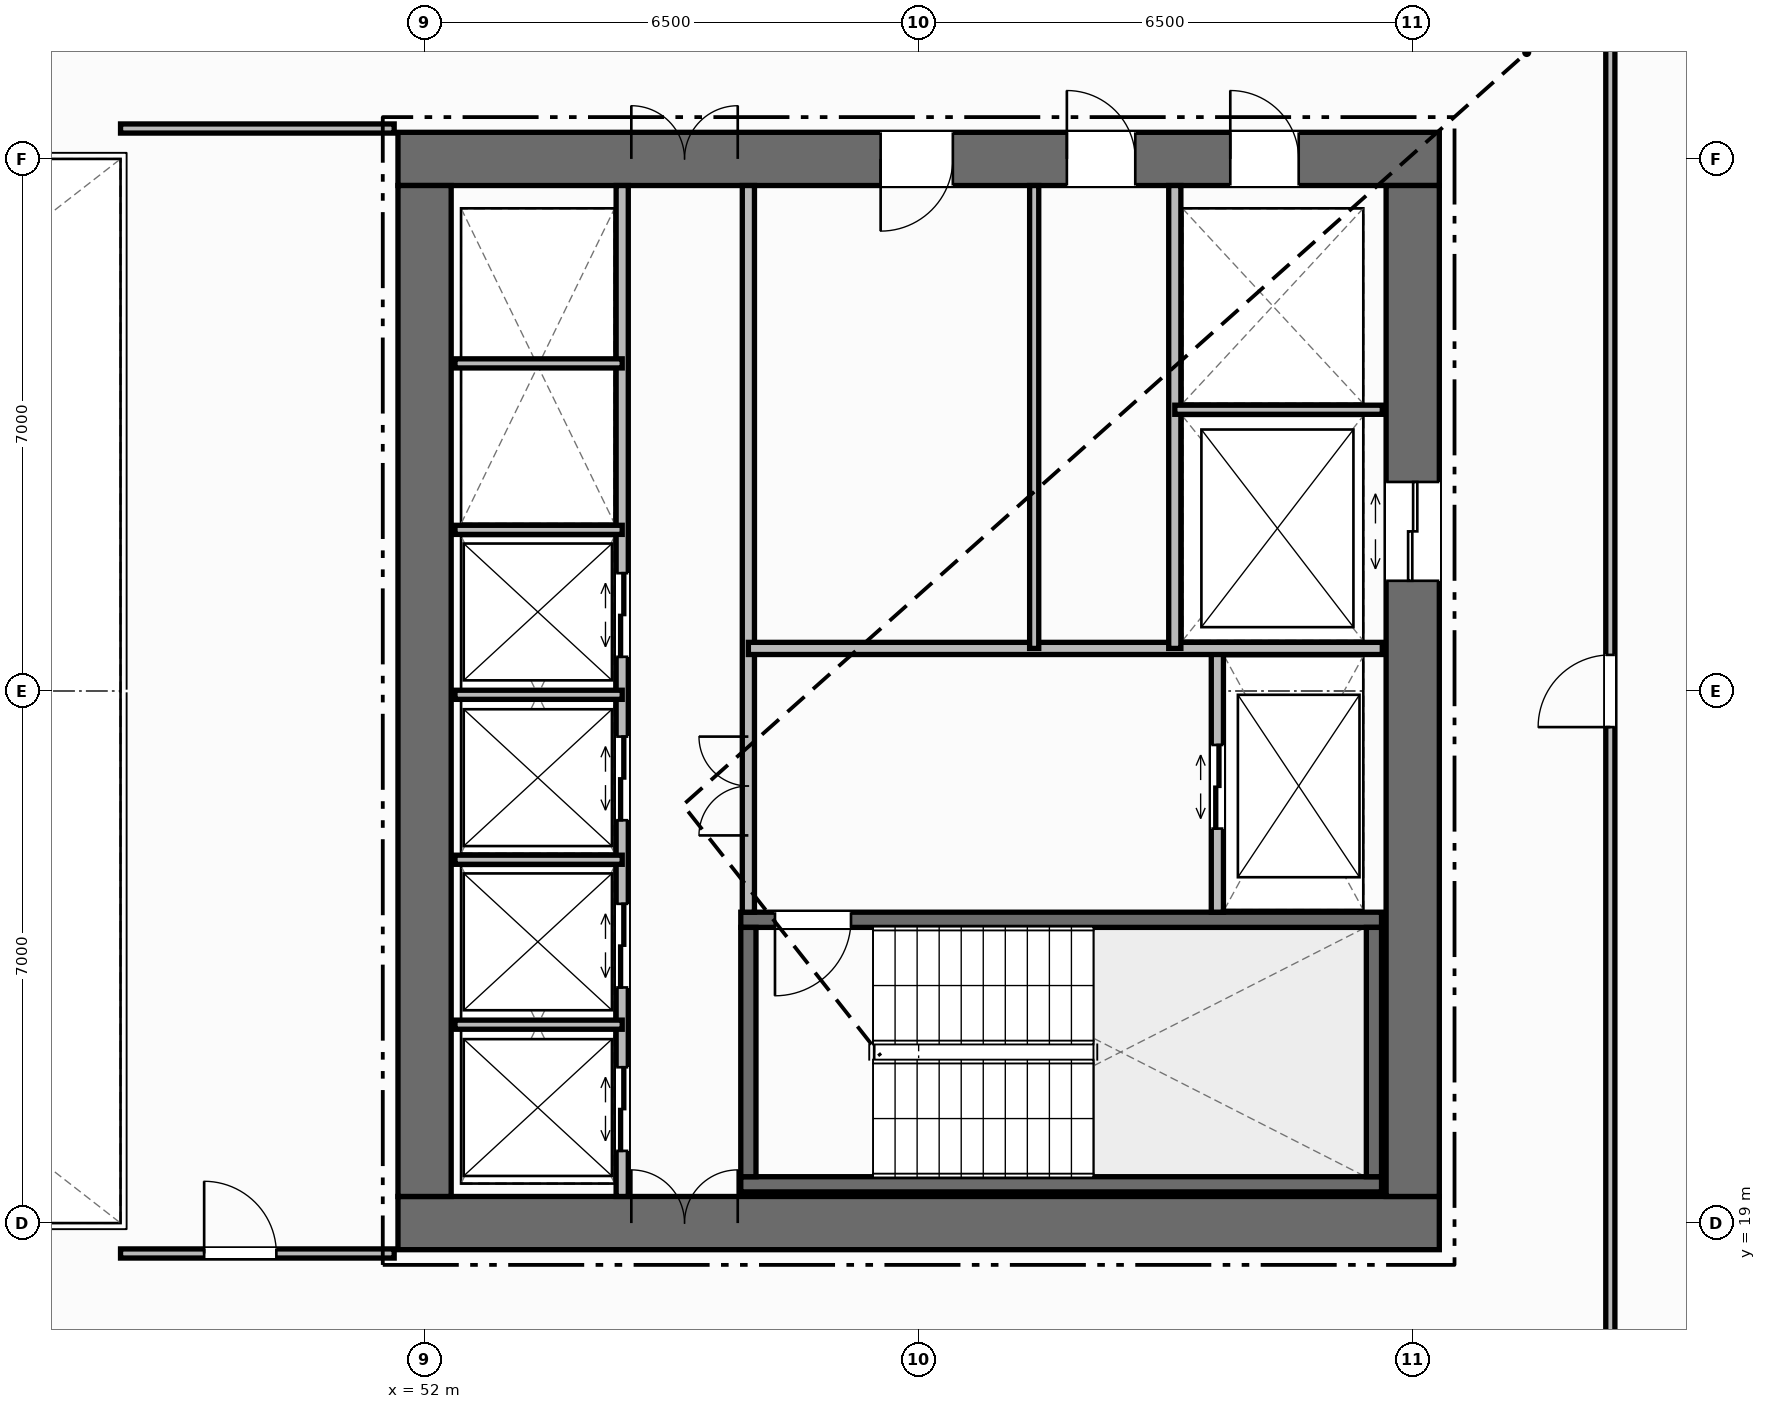
"""IFC4 building model, lengths in metres.
Left out: names, types, materials, properties, quantities, classifications, styles, units other than length and angle.
Written with IfcOpenShell. Run it as: python <this file> out.ifc"""

import sys

from ifc_helpers import new_model, si_unit, direction, frame, frame_2d, origin, place, context, subcontext, project, spatial, rectangle, extrude, element, fill, save


model = new_model("IFC4")
c1 = context("Model", 3, precision=1e-05, world=origin(), true_north=direction((0.0, 1.0)))
c2 = subcontext(c1, "Body", "Model", "MODEL_VIEW")
j1 = project(units=[si_unit("LENGTHUNIT", "METRE"), si_unit("PLANEANGLEUNIT", "RADIAN")], contexts=[c1])
p1 = place(None, origin())
s1 = spatial("IfcSite", under=j1, at=p1, CompositionType="ELEMENT")
p2 = place(p1, origin())
s2 = spatial("IfcBuilding", under=s1, at=p2, CompositionType="ELEMENT")
p3 = place(p2, frame((0.0, 0.0, 86.0)))
s3 = spatial("IfcBuildingStorey", under=s2, at=p3, CompositionType="ELEMENT", Elevation=86.0)
p4 = place(p3, frame((51.65, 19.0, 0.0), z_axis=(0.0, 0.0, 1.0), x_axis=(1.0, 0.0, 0.0)))
e1 = element("IfcWall", 1, at=p4, inside=s3, PredefinedType="SHEAR", context=c2, shape_type="SweptSolid", body=[
    extrude(rectangle(XDim=13.7, YDim=0.7, at=frame_2d((6.85, 0.0))), origin(), (0.0, 0.0, 1.0), 3.8),
])
p5 = place(p4, frame((3.07, 0.0, 0.0)))
e2 = element("IfcOpeningElement", 2, at=p5, cuts=e1, PredefinedType="OPENING", context=c2, shape_type="SweptSolid", body=[
    extrude(rectangle(XDim=1.4, YDim=2.2, at=frame_2d((0.7, 1.1))), frame((0.0, 0.36, 0.0), z_axis=(0.0, -1.0, 0.0), x_axis=(1.0, 0.0, 0.0)), (0.0, 0.0, 1.0), 0.72),
])
p6 = place(p3, frame((51.65, 33.0, 0.0), z_axis=(0.0, 0.0, 1.0), x_axis=(1.0, 0.0, 0.0)))
e3 = element("IfcWall", 3, at=p6, inside=s3, PredefinedType="SHEAR", context=c2, shape_type="SweptSolid", body=[
    extrude(rectangle(XDim=13.7, YDim=0.7, at=frame_2d((6.85, 0.0))), origin(), (0.0, 0.0, 1.0), 3.8),
])
p7 = place(p6, frame((3.07, 0.0, 0.0)))
e4 = element("IfcOpeningElement", 4, at=p7, cuts=e3, PredefinedType="OPENING", context=c2, shape_type="SweptSolid", body=[
    extrude(rectangle(XDim=1.4, YDim=2.2, at=frame_2d((0.7, 1.1))), frame((0.0, 0.36, 0.0), z_axis=(0.0, -1.0, 0.0), x_axis=(1.0, 0.0, 0.0)), (0.0, 0.0, 1.0), 0.72),
])
p8 = place(p6, frame((10.95, 0.0, 0.0)))
e5 = element("IfcOpeningElement", 5, at=p8, cuts=e3, PredefinedType="OPENING", context=c2, shape_type="SweptSolid", body=[
    extrude(rectangle(XDim=0.9, YDim=2.15, at=frame_2d((0.45, 1.075))), frame((0.0, 0.36, 0.0), z_axis=(0.0, -1.0, 0.0), x_axis=(1.0, 0.0, 0.0)), (0.0, 0.0, 1.0), 0.72),
])
p9 = place(p6, frame((6.35, 0.0, 0.0)))
e6 = element("IfcOpeningElement", 6, at=p9, cuts=e3, PredefinedType="OPENING", context=c2, shape_type="SweptSolid", body=[
    extrude(rectangle(XDim=0.95, YDim=2.15, at=frame_2d((0.475, 1.075))), frame((0.0, 0.36, 0.0), z_axis=(0.0, -1.0, 0.0), x_axis=(1.0, 0.0, 0.0)), (0.0, 0.0, 1.0), 0.72),
])
p10 = place(p6, frame((8.8, 0.0, 0.0)))
e7 = element("IfcOpeningElement", 7, at=p10, cuts=e3, PredefinedType="OPENING", context=c2, shape_type="SweptSolid", body=[
    extrude(rectangle(XDim=0.9, YDim=2.15, at=frame_2d((0.45, 1.075))), frame((0.0, 0.36, 0.0), z_axis=(0.0, -1.0, 0.0), x_axis=(1.0, 0.0, 0.0)), (0.0, 0.0, 1.0), 0.72),
])
p11 = place(p3, frame((52.0, 19.35, 0.0), z_axis=(0.0, 0.0, 1.0), x_axis=(0.0, 1.0, 0.0)))
e8 = element("IfcWall", 8, at=p11, inside=s3, PredefinedType="SHEAR", context=c2, shape_type="SweptSolid", body=[
    extrude(rectangle(XDim=13.3, YDim=0.7, at=frame_2d((6.65, 0.0))), origin(), (0.0, 0.0, 1.0), 3.8),
])
p12 = place(p3, frame((65.0, 19.35, 0.0), z_axis=(0.0, 0.0, 1.0), x_axis=(0.0, 1.0, 0.0)))
e9 = element("IfcWall", 9, at=p12, inside=s3, PredefinedType="SHEAR", context=c2, shape_type="SweptSolid", body=[
    extrude(rectangle(XDim=13.3, YDim=0.7, at=frame_2d((6.65, 0.0))), origin(), (0.0, 0.0, 1.0), 3.8),
])
p13 = place(p12, frame((8.1, 0.0, 0.0)))
e10 = element("IfcOpeningElement", 10, at=p13, cuts=e9, PredefinedType="OPENING", context=c2, shape_type="SweptSolid", body=[
    extrude(rectangle(XDim=1.3, YDim=2.2, at=frame_2d((0.65, 1.1))), frame((0.0, 0.36, 0.0), z_axis=(0.0, -1.0, 0.0), x_axis=(1.0, 0.0, 0.0)), (0.0, 0.0, 1.0), 0.72),
])
p14 = place(p3, frame((56.16, 19.51, 0.0), z_axis=(0.0, 0.0, 1.0), x_axis=(1.0, 0.0, 0.0)))
e11 = element("IfcWall", 11, at=p14, inside=s3, PredefinedType="SHEAR", context=c2, shape_type="SweptSolid", body=[
    extrude(rectangle(XDim=8.43, YDim=0.2, at=frame_2d((4.215, 0.0))), origin(), (0.0, 0.0, 1.0), 3.8),
])
p15 = place(p3, frame((56.16, 22.99, 0.0), z_axis=(0.0, 0.0, 1.0), x_axis=(1.0, 0.0, 0.0)))
e12 = element("IfcWall", 12, at=p15, inside=s3, PredefinedType="SHEAR", context=c2, shape_type="SweptSolid", body=[
    extrude(rectangle(XDim=8.43, YDim=0.2, at=frame_2d((4.215, 0.0))), origin(), (0.0, 0.0, 1.0), 3.8),
])
p16 = place(p15, frame((0.45, 0.0, 0.0)))
e13 = element("IfcOpeningElement", 13, at=p16, cuts=e12, PredefinedType="OPENING", context=c2, shape_type="SweptSolid", body=[
    extrude(rectangle(XDim=1.0, YDim=2.15, at=frame_2d((0.5, 1.075))), frame((0.0, 0.11, 0.0), z_axis=(0.0, -1.0, 0.0), x_axis=(1.0, 0.0, 0.0)), (0.0, 0.0, 1.0), 0.22),
])
for number, where, z_axis, x_axis in (
    (14, (56.26, 19.61, 0.0), (0.0, 0.0, 1.0), (0.0, 1.0, 0.0)),
    (15, (64.49, 19.61, 0.0), (0.0, 0.0, 1.0), (0.0, 1.0, 0.0)),
):
    element("IfcWall", number, at=place(p3, frame(where, z_axis=z_axis, x_axis=x_axis)), inside=s3, PredefinedType="SHEAR", context=c2, shape_type="SweptSolid", body=[
        extrude(rectangle(XDim=3.28, YDim=0.2, at=frame_2d((1.64, 0.0))), origin(), (0.0, 0.0, 1.0), 3.8),
    ])
p17 = place(p3, frame((54.6, 19.35, 0.0), z_axis=(0.0, 0.0, 1.0), x_axis=(0.0, 1.0, 0.0)))
e16 = element("IfcWall", 16, at=p17, inside=s3, PredefinedType="STANDARD", context=c2, shape_type="SweptSolid", body=[
    extrude(rectangle(XDim=13.3, YDim=0.16, at=frame_2d((6.65, 0.0))), origin(), (0.0, 0.0, 1.0), 3.565),
])
p18 = place(p17, frame((0.6, 0.0, 0.0)))
e17 = element("IfcOpeningElement", 17, at=p18, cuts=e16, PredefinedType="OPENING", context=c2, shape_type="SweptSolid", body=[
    extrude(rectangle(XDim=1.1, YDim=2.2, at=frame_2d((0.55, 1.1))), frame((0.0, 0.09, 0.0), z_axis=(0.0, -1.0, 0.0), x_axis=(1.0, 0.0, 0.0)), (0.0, 0.0, 1.0), 0.18),
])
p19 = place(p17, frame((2.75, 0.0, 0.0)))
e18 = element("IfcOpeningElement", 18, at=p19, cuts=e16, PredefinedType="OPENING", context=c2, shape_type="SweptSolid", body=[
    extrude(rectangle(XDim=1.1, YDim=2.2, at=frame_2d((0.55, 1.1))), frame((0.0, 0.09, 0.0), z_axis=(0.0, -1.0, 0.0), x_axis=(1.0, 0.0, 0.0)), (0.0, 0.0, 1.0), 0.18),
])
p20 = place(p17, frame((4.95, 0.0, 0.0)))
e19 = element("IfcOpeningElement", 19, at=p20, cuts=e16, PredefinedType="OPENING", context=c2, shape_type="SweptSolid", body=[
    extrude(rectangle(XDim=1.1, YDim=2.2, at=frame_2d((0.55, 1.1))), frame((0.0, 0.09, 0.0), z_axis=(0.0, -1.0, 0.0), x_axis=(1.0, 0.0, 0.0)), (0.0, 0.0, 1.0), 0.18),
])
p21 = place(p17, frame((7.1, 0.0, 0.0)))
e20 = element("IfcOpeningElement", 20, at=p21, cuts=e16, PredefinedType="OPENING", context=c2, shape_type="SweptSolid", body=[
    extrude(rectangle(XDim=1.1, YDim=2.2, at=frame_2d((0.55, 1.1))), frame((0.0, 0.09, 0.0), z_axis=(0.0, -1.0, 0.0), x_axis=(1.0, 0.0, 0.0)), (0.0, 0.0, 1.0), 0.18),
])
p22 = place(p3, frame((56.26, 23.09, 0.0), z_axis=(0.0, 0.0, 1.0), x_axis=(0.0, 1.0, 0.0)))
e21 = element("IfcWall", 21, at=p22, inside=s3, PredefinedType="STANDARD", context=c2, shape_type="SweptSolid", body=[
    extrude(rectangle(XDim=9.56, YDim=0.16, at=frame_2d((4.78, 0.0))), origin(), (0.0, 0.0, 1.0), 3.565),
])
p23 = place(p22, frame((1.01, 0.0, 0.0)))
e22 = element("IfcOpeningElement", 22, at=p23, cuts=e21, PredefinedType="OPENING", context=c2, shape_type="SweptSolid", body=[
    extrude(rectangle(XDim=1.3, YDim=2.2, at=frame_2d((0.65, 1.1))), frame((0.0, 0.09, 0.0), z_axis=(0.0, -1.0, 0.0), x_axis=(1.0, 0.0, 0.0)), (0.0, 0.0, 1.0), 0.18),
])
for number, where, z_axis, x_axis in (
    (23, (52.4, 21.61, 0.0), (0.0, 0.0, 1.0), (1.0, 0.0, 0.0)),
    (24, (52.4, 23.78, 0.0), (0.0, 0.0, 1.0), (1.0, 0.0, 0.0)),
    (25, (52.4, 25.95, 0.0), (0.0, 0.0, 1.0), (1.0, 0.0, 0.0)),
    (26, (52.4, 28.12, 0.0), (0.0, 0.0, 1.0), (1.0, 0.0, 0.0)),
    (27, (52.4, 30.31, 0.0), (0.0, 0.0, 1.0), (1.0, 0.0, 0.0)),
):
    element("IfcWall", number, at=place(p3, frame(where, z_axis=z_axis, x_axis=x_axis)), inside=s3, PredefinedType="PARTITIONING", context=c2, shape_type="SweptSolid", body=[
        extrude(rectangle(XDim=2.2, YDim=0.12, at=frame_2d((1.1, 0.0))), origin(), (0.0, 0.0, 1.0), 3.565),
    ])
p24 = place(p3, frame((62.43, 23.09, 0.0), z_axis=(0.0, 0.0, 1.0), x_axis=(0.0, 1.0, 0.0)))
e28 = element("IfcWall", 28, at=p24, inside=s3, PredefinedType="STANDARD", context=c2, shape_type="SweptSolid", body=[
    extrude(rectangle(XDim=3.47, YDim=0.16, at=frame_2d((1.735, 0.0))), origin(), (0.0, 0.0, 1.0), 3.565),
])
p25 = place(p24, frame((1.1, 0.0, 0.0)))
e29 = element("IfcOpeningElement", 29, at=p25, cuts=e28, PredefinedType="OPENING", context=c2, shape_type="SweptSolid", body=[
    extrude(rectangle(XDim=1.1, YDim=2.2, at=frame_2d((0.55, 1.1))), frame((0.0, 0.09, 0.0), z_axis=(0.0, -1.0, 0.0), x_axis=(1.0, 0.0, 0.0)), (0.0, 0.0, 1.0), 0.18),
])
p26 = place(p3, frame((56.26, 26.56, 0.0), z_axis=(0.0, 0.0, 1.0), x_axis=(1.0, 0.0, 0.0)))
e30 = element("IfcWall", 30, at=p26, inside=s3, PredefinedType="STANDARD", context=c2, shape_type="SweptSolid", body=[
    extrude(rectangle(XDim=8.34, YDim=0.16, at=frame_2d((4.17, 0.0))), origin(), (0.0, 0.0, 1.0), 3.565),
])
p27 = place(p3, frame((61.87, 26.56, 0.0), z_axis=(0.0, 0.0, 1.0), x_axis=(0.0, 1.0, 0.0)))
e31 = element("IfcWall", 31, at=p27, inside=s3, PredefinedType="STANDARD", context=c2, shape_type="SweptSolid", body=[
    extrude(rectangle(XDim=6.09, YDim=0.16, at=frame_2d((3.045, 0.0))), origin(), (0.0, 0.0, 1.0), 3.565),
])
p28 = place(p3, frame((61.87, 29.7, 0.0), z_axis=(0.0, 0.0, 1.0), x_axis=(1.0, 0.0, 0.0)))
e32 = element("IfcWall", 32, at=p28, inside=s3, PredefinedType="PARTITIONING", context=c2, shape_type="SweptSolid", body=[
    extrude(rectangle(XDim=2.73, YDim=0.12, at=frame_2d((1.365, 0.0))), origin(), (0.0, 0.0, 1.0), 3.565),
])
p29 = place(p3, frame((60.02, 26.56, 0.0), z_axis=(0.0, 0.0, 1.0), x_axis=(0.0, 1.0, 0.0)))
e33 = element("IfcWall", 33, at=p29, inside=s3, PredefinedType="PARTITIONING", context=c2, shape_type="SweptSolid", body=[
    extrude(rectangle(XDim=6.09, YDim=0.12, at=frame_2d((3.045, 0.0))), origin(), (0.0, 0.0, 1.0), 3.565),
])
p30 = place(p3, frame((48.0, 33.4, 0.0), z_axis=(0.0, 0.0, 1.0), x_axis=(1.0, 0.0, 0.0)))
e34 = element("IfcWall", 34, at=p30, inside=s3, PredefinedType="PARTITIONING", context=c2, shape_type="SweptSolid", body=[
    extrude(rectangle(XDim=3.6, YDim=0.12, at=frame_2d((1.8, 0.0))), origin(), (0.0, 0.0, 1.0), 3.565),
])
p31 = place(p3, frame((48.0, 18.6, 0.0), z_axis=(0.0, 0.0, 1.0), x_axis=(1.0, 0.0, 0.0)))
e35 = element("IfcWall", 35, at=p31, inside=s3, PredefinedType="PARTITIONING", context=c2, shape_type="SweptSolid", body=[
    extrude(rectangle(XDim=3.6, YDim=0.12, at=frame_2d((1.8, 0.0))), origin(), (0.0, 0.0, 1.0), 3.565),
])
p32 = place(p31, frame((1.1, 0.0, 0.0)))
e36 = element("IfcOpeningElement", 36, at=p32, cuts=e35, PredefinedType="OPENING", context=c2, shape_type="SweptSolid", body=[
    extrude(rectangle(XDim=0.95, YDim=2.15, at=frame_2d((0.475, 1.075))), frame((0.0, 0.07, 0.0), z_axis=(0.0, -1.0, 0.0), x_axis=(1.0, 0.0, 0.0)), (0.0, 0.0, 1.0), 0.14),
])
p33 = place(p3, frame((67.6, 16.5, 0.0), z_axis=(0.0, 0.0, 1.0), x_axis=(0.0, 1.0, 0.0)))
e37 = element("IfcWall", 37, at=p33, inside=s3, PredefinedType="PARTITIONING", context=c2, shape_type="SweptSolid", body=[
    extrude(rectangle(XDim=19.0, YDim=0.12, at=frame_2d((9.5, 0.0))), origin(), (0.0, 0.0, 1.0), 3.565),
])
p34 = place(p33, frame((9.025, 0.0, 0.0)))
e38 = element("IfcOpeningElement", 38, at=p34, cuts=e37, PredefinedType="OPENING", context=c2, shape_type="SweptSolid", body=[
    extrude(rectangle(XDim=0.95, YDim=2.15, at=frame_2d((0.475, 1.075))), frame((0.0, 0.07, 0.0), z_axis=(0.0, -1.0, 0.0), x_axis=(1.0, 0.0, 0.0)), (0.0, 0.0, 1.0), 0.14),
])
p35 = place(p5, origin())
e39 = element("IfcDoor", 39, at=p35, inside=s3, OperationType="DOUBLE_DOOR_SINGLE_SWING", PredefinedType="DOOR", context=c2, shape_type="SweptSolid", body=[
    extrude(rectangle(XDim=1.4, YDim=2.2, at=frame_2d((0.7, 1.1))), frame((0.0, 0.125, 0.0), z_axis=(0.0, -1.0, 0.0), x_axis=(1.0, 0.0, 0.0)), (0.0, 0.0, 1.0), 0.05),
])
fill(e2, e39)
p36 = place(p7, origin())
e40 = element("IfcDoor", 40, at=p36, inside=s3, OperationType="DOUBLE_DOOR_SINGLE_SWING", PredefinedType="DOOR", context=c2, shape_type="SweptSolid", body=[
    extrude(rectangle(XDim=1.4, YDim=2.2, at=frame_2d((0.7, 1.1))), frame((0.0, -0.075, 0.0), z_axis=(0.0, -1.0, 0.0), x_axis=(1.0, 0.0, 0.0)), (0.0, 0.0, 1.0), 0.05),
])
fill(e4, e40)
p37 = place(p18, origin())
e41 = element("IfcDoor", 41, at=p37, inside=s3, OperationType="DOUBLE_DOOR_SLIDING", PredefinedType="DOOR", context=c2, shape_type="SweptSolid", body=[
    extrude(rectangle(XDim=1.1, YDim=2.2, at=frame_2d((0.55, 1.1))), frame((0.0, 0.025, 0.0), z_axis=(0.0, -1.0, 0.0), x_axis=(1.0, 0.0, 0.0)), (0.0, 0.0, 1.0), 0.05),
])
fill(e17, e41)
p38 = place(p19, origin())
e42 = element("IfcDoor", 42, at=p38, inside=s3, OperationType="DOUBLE_DOOR_SLIDING", PredefinedType="DOOR", context=c2, shape_type="SweptSolid", body=[
    extrude(rectangle(XDim=1.1, YDim=2.2, at=frame_2d((0.55, 1.1))), frame((0.0, 0.025, 0.0), z_axis=(0.0, -1.0, 0.0), x_axis=(1.0, 0.0, 0.0)), (0.0, 0.0, 1.0), 0.05),
])
fill(e18, e42)
p39 = place(p20, origin())
e43 = element("IfcDoor", 43, at=p39, inside=s3, OperationType="DOUBLE_DOOR_SLIDING", PredefinedType="DOOR", context=c2, shape_type="SweptSolid", body=[
    extrude(rectangle(XDim=1.1, YDim=2.2, at=frame_2d((0.55, 1.1))), frame((0.0, 0.025, 0.0), z_axis=(0.0, -1.0, 0.0), x_axis=(1.0, 0.0, 0.0)), (0.0, 0.0, 1.0), 0.05),
])
fill(e19, e43)
p40 = place(p21, origin())
e44 = element("IfcDoor", 44, at=p40, inside=s3, OperationType="DOUBLE_DOOR_SLIDING", PredefinedType="DOOR", context=c2, shape_type="SweptSolid", body=[
    extrude(rectangle(XDim=1.1, YDim=2.2, at=frame_2d((0.55, 1.1))), frame((0.0, 0.025, 0.0), z_axis=(0.0, -1.0, 0.0), x_axis=(1.0, 0.0, 0.0)), (0.0, 0.0, 1.0), 0.05),
])
fill(e20, e44)
p41 = place(p16, origin())
e45 = element("IfcDoor", 45, at=p41, inside=s3, OperationType="SINGLE_SWING_RIGHT", PredefinedType="DOOR", context=c2, shape_type="SweptSolid", body=[
    extrude(rectangle(XDim=1.0, YDim=2.15, at=frame_2d((0.5, 1.075))), frame((0.0, 0.025, 0.0), z_axis=(0.0, -1.0, 0.0), x_axis=(1.0, 0.0, 0.0)), (0.0, 0.0, 1.0), 0.05),
])
fill(e13, e45)
p42 = place(p25, origin())
e46 = element("IfcDoor", 46, at=p42, inside=s3, OperationType="DOUBLE_DOOR_SLIDING", PredefinedType="DOOR", context=c2, shape_type="SweptSolid", body=[
    extrude(rectangle(XDim=1.1, YDim=2.2, at=frame_2d((0.55, 1.1))), frame((0.0, 0.025, 0.0), z_axis=(0.0, -1.0, 0.0), x_axis=(1.0, 0.0, 0.0)), (0.0, 0.0, 1.0), 0.05),
])
fill(e29, e46)
p43 = place(p23, origin())
e47 = element("IfcDoor", 47, at=p43, inside=s3, OperationType="DOUBLE_DOOR_SINGLE_SWING", PredefinedType="DOOR", context=c2, shape_type="SweptSolid", body=[
    extrude(rectangle(XDim=1.3, YDim=2.2, at=frame_2d((0.65, 1.1))), frame((0.0, 0.025, 0.0), z_axis=(0.0, -1.0, 0.0), x_axis=(1.0, 0.0, 0.0)), (0.0, 0.0, 1.0), 0.05),
])
fill(e22, e47)
p44 = place(p13, origin())
e48 = element("IfcDoor", 48, at=p44, inside=s3, OperationType="DOUBLE_DOOR_SLIDING", PredefinedType="DOOR", context=c2, shape_type="SweptSolid", body=[
    extrude(rectangle(XDim=1.3, YDim=2.2, at=frame_2d((0.65, 1.1))), frame((0.0, 0.025, 0.0), z_axis=(0.0, -1.0, 0.0), x_axis=(1.0, 0.0, 0.0)), (0.0, 0.0, 1.0), 0.05),
])
fill(e10, e48)
p45 = place(p8, origin())
e49 = element("IfcDoor", 49, at=p45, inside=s3, OperationType="SINGLE_SWING_LEFT", PredefinedType="DOOR", context=c2, shape_type="SweptSolid", body=[
    extrude(rectangle(XDim=0.9, YDim=2.15, at=frame_2d((0.45, 1.075))), frame((0.0, -0.075, 0.0), z_axis=(0.0, -1.0, 0.0), x_axis=(1.0, 0.0, 0.0)), (0.0, 0.0, 1.0), 0.05),
])
fill(e5, e49)
p46 = place(p9, origin())
e50 = element("IfcDoor", 50, at=p46, inside=s3, OperationType="SINGLE_SWING_RIGHT", PredefinedType="DOOR", context=c2, shape_type="SweptSolid", body=[
    extrude(rectangle(XDim=0.95, YDim=2.15, at=frame_2d((0.475, 1.075))), frame((0.0, -0.075, 0.0), z_axis=(0.0, -1.0, 0.0), x_axis=(1.0, 0.0, 0.0)), (0.0, 0.0, 1.0), 0.05),
])
fill(e6, e50)
p47 = place(p10, origin())
e51 = element("IfcDoor", 51, at=p47, inside=s3, OperationType="SINGLE_SWING_LEFT", PredefinedType="DOOR", context=c2, shape_type="SweptSolid", body=[
    extrude(rectangle(XDim=0.9, YDim=2.15, at=frame_2d((0.45, 1.075))), frame((0.0, -0.075, 0.0), z_axis=(0.0, -1.0, 0.0), x_axis=(1.0, 0.0, 0.0)), (0.0, 0.0, 1.0), 0.05),
])
fill(e7, e51)
p48 = place(p32, origin())
e52 = element("IfcDoor", 52, at=p48, inside=s3, OperationType="SINGLE_SWING_LEFT", PredefinedType="DOOR", context=c2, shape_type="SweptSolid", body=[
    extrude(rectangle(XDim=0.95, YDim=2.15, at=frame_2d((0.475, 1.075))), frame((0.0, 0.025, 0.0), z_axis=(0.0, -1.0, 0.0), x_axis=(1.0, 0.0, 0.0)), (0.0, 0.0, 1.0), 0.05),
])
fill(e36, e52)
p49 = place(p34, origin())
e53 = element("IfcDoor", 53, at=p49, inside=s3, OperationType="SINGLE_SWING_LEFT", PredefinedType="DOOR", context=c2, shape_type="SweptSolid", body=[
    extrude(rectangle(XDim=0.95, YDim=2.15, at=frame_2d((0.475, 1.075))), frame((0.0, 0.025, 0.0), z_axis=(0.0, -1.0, 0.0), x_axis=(1.0, 0.0, 0.0)), (0.0, 0.0, 1.0), 0.05),
])
fill(e38, e53)
save(model, sys.argv[1])
